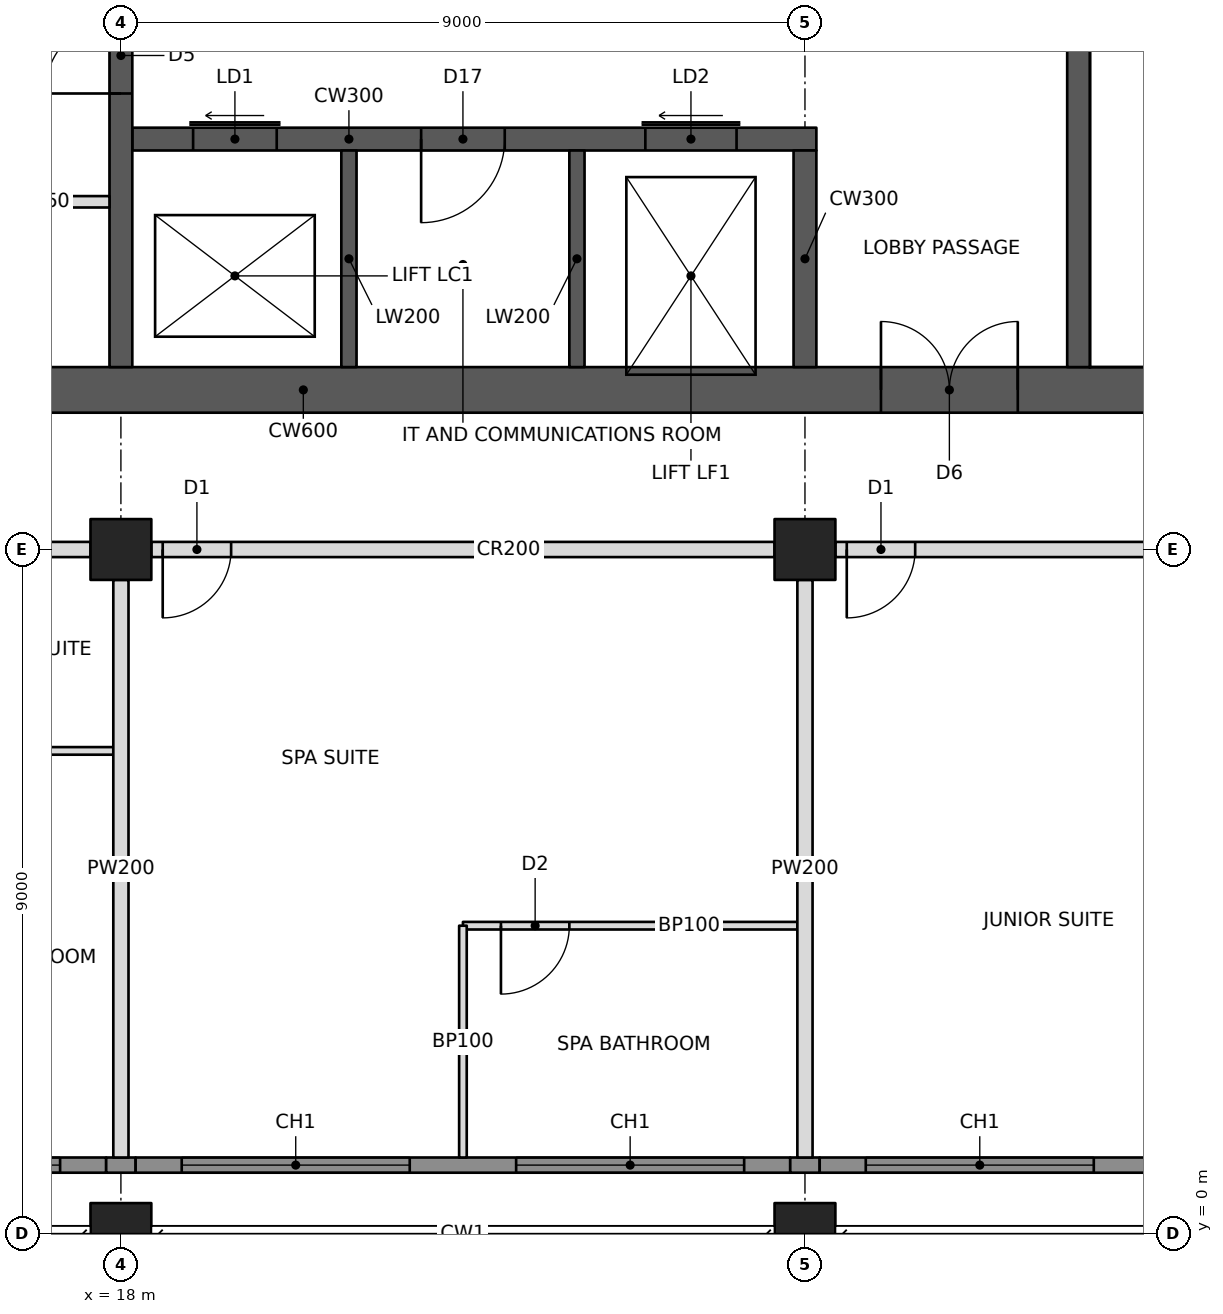
"""IFC4 building model, lengths in metres.
Left out: names, types, materials, properties, quantities, classifications, styles, units other than length and angle.
Written with IfcOpenShell. Run it as: python <this file> out.ifc"""

import sys

from ifc_helpers import new_model, si_unit, direction, frame, frame_2d, origin, origin_2d, place, context, subcontext, project, spatial, rectangle, hollow_rectangle, extrude, element, fill, save


model = new_model("IFC4")
c1 = context("Model", 3, precision=1e-05, world=origin(), true_north=direction((0.0, 1.0)))
c2 = subcontext(c1, "Body", "Model", "MODEL_VIEW")
j1 = project(units=[si_unit("LENGTHUNIT", "METRE"), si_unit("PLANEANGLEUNIT", "RADIAN")], contexts=[c1])
p1 = place(None, origin())
s1 = spatial("IfcSite", under=j1, at=p1, CompositionType="ELEMENT")
p2 = place(p1, origin())
s2 = spatial("IfcBuilding", under=s1, at=p2, CompositionType="ELEMENT")
p3 = place(p2, frame((0.0, 0.0, 187.6)))
s3 = spatial("IfcBuildingStorey", under=s2, at=p3, CompositionType="ELEMENT", Elevation=187.6)
p4 = place(p3, frame((18.0, 0.0, 0.0), z_axis=(0.0, 0.0, 1.0), x_axis=(1.0, 0.0, 0.0)))
e1 = element("IfcColumn", 1, at=p4, inside=s3, PredefinedType="COLUMN", context=c2, shape_type="SweptSolid", body=[
    extrude(hollow_rectangle(XDim=0.8, YDim=0.8, WallThickness=0.07, at=origin_2d()), origin(), (0.0, 0.0, 1.0), 3.4),
])
p5 = place(p3, frame((18.0, 9.0, 0.0), z_axis=(0.0, 0.0, 1.0), x_axis=(1.0, 0.0, 0.0)))
e2 = element("IfcColumn", 2, at=p5, inside=s3, PredefinedType="COLUMN", context=c2, shape_type="SweptSolid", body=[
    extrude(hollow_rectangle(XDim=0.8, YDim=0.8, WallThickness=0.06, at=origin_2d()), origin(), (0.0, 0.0, 1.0), 3.4),
])
p6 = place(p3, frame((27.0, 0.0, 0.0), z_axis=(0.0, 0.0, 1.0), x_axis=(1.0, 0.0, 0.0)))
e3 = element("IfcColumn", 3, at=p6, inside=s3, PredefinedType="COLUMN", context=c2, shape_type="SweptSolid", body=[
    extrude(hollow_rectangle(XDim=0.8, YDim=0.8, WallThickness=0.07, at=origin_2d()), origin(), (0.0, 0.0, 1.0), 3.4),
])
p7 = place(p3, frame((27.0, 9.0, 0.0), z_axis=(0.0, 0.0, 1.0), x_axis=(1.0, 0.0, 0.0)))
e4 = element("IfcColumn", 4, at=p7, inside=s3, PredefinedType="COLUMN", context=c2, shape_type="SweptSolid", body=[
    extrude(hollow_rectangle(XDim=0.8, YDim=0.8, WallThickness=0.06, at=origin_2d()), origin(), (0.0, 0.0, 1.0), 3.4),
])
p8 = place(p3, frame((10.8, 11.1, 0.0), z_axis=(0.0, 0.0, 1.0), x_axis=(1.0, 0.0, 0.0)))
e5 = element("IfcWall", 5, at=p8, inside=s3, PredefinedType="SHEAR", context=c2, shape_type="SweptSolid", body=[
    extrude(rectangle(XDim=23.4, YDim=0.6, at=frame_2d((11.7, 0.0))), origin(), (0.0, 0.0, 1.0), 3.4),
])
p9 = place(p8, frame((1.0, 0.0, 0.0)))
e6 = element("IfcOpeningElement", 6, at=p9, cuts=e5, PredefinedType="OPENING", context=c2, shape_type="SweptSolid", body=[
    extrude(rectangle(XDim=1.0, YDim=2.1, at=frame_2d((0.5, 1.05))), frame((0.0, 0.31, 0.0), z_axis=(0.0, -1.0, 0.0), x_axis=(1.0, 0.0, 0.0)), (0.0, 0.0, 1.0), 0.62),
])
p10 = place(p8, frame((17.2, 0.0, 0.0)))
e7 = element("IfcOpeningElement", 7, at=p10, cuts=e5, PredefinedType="OPENING", context=c2, shape_type="SweptSolid", body=[
    extrude(rectangle(XDim=1.8, YDim=2.1, at=frame_2d((0.9, 1.05))), frame((0.0, 0.31, 0.0), z_axis=(0.0, -1.0, 0.0), x_axis=(1.0, 0.0, 0.0)), (0.0, 0.0, 1.0), 0.62),
])
p11 = place(p3, frame((18.0, 11.4, 0.0), z_axis=(0.0, 0.0, 1.0), x_axis=(0.0, 1.0, 0.0)))
e8 = element("IfcWall", 8, at=p11, inside=s3, PredefinedType="SHEAR", context=c2, shape_type="SweptSolid", body=[
    extrude(rectangle(XDim=13.2, YDim=0.3, at=frame_2d((6.6, 0.0))), origin(), (0.0, 0.0, 1.0), 3.4),
])
p12 = place(p11, frame((3.6, 0.0, 0.0)))
e9 = element("IfcOpeningElement", 9, at=p12, cuts=e8, PredefinedType="OPENING", context=c2, shape_type="SweptSolid", body=[
    extrude(rectangle(XDim=1.0, YDim=2.1, at=frame_2d((0.5, 1.05))), frame((0.0, 0.16, 0.0), z_axis=(0.0, -1.0, 0.0), x_axis=(1.0, 0.0, 0.0)), (0.0, 0.0, 1.0), 0.32),
])
p13 = place(p11, frame((7.85, 0.0, 0.0)))
e10 = element("IfcOpeningElement", 10, at=p13, cuts=e8, PredefinedType="OPENING", context=c2, shape_type="SweptSolid", body=[
    extrude(rectangle(XDim=1.1, YDim=2.1, at=frame_2d((0.55, 1.05))), frame((0.0, 0.16, 0.0), z_axis=(0.0, -1.0, 0.0), x_axis=(1.0, 0.0, 0.0)), (0.0, 0.0, 1.0), 0.32),
])
p14 = place(p3, frame((18.15, 14.4, 0.0), z_axis=(0.0, 0.0, 1.0), x_axis=(1.0, 0.0, 0.0)))
e11 = element("IfcWall", 11, at=p14, inside=s3, PredefinedType="SHEAR", context=c2, shape_type="SweptSolid", body=[
    extrude(rectangle(XDim=9.0, YDim=0.3, at=frame_2d((4.5, 0.0))), origin(), (0.0, 0.0, 1.0), 3.4),
])
p15 = place(p14, frame((0.8, 0.0, 0.0)))
e12 = element("IfcOpeningElement", 12, at=p15, cuts=e11, PredefinedType="OPENING", context=c2, shape_type="SweptSolid", body=[
    extrude(rectangle(XDim=1.1, YDim=2.1, at=frame_2d((0.55, 1.05))), frame((0.0, 0.16, 0.0), z_axis=(0.0, -1.0, 0.0), x_axis=(1.0, 0.0, 0.0)), (0.0, 0.0, 1.0), 0.32),
])
p16 = place(p14, frame((6.75, 0.0, 0.0)))
e13 = element("IfcOpeningElement", 13, at=p16, cuts=e11, PredefinedType="OPENING", context=c2, shape_type="SweptSolid", body=[
    extrude(rectangle(XDim=1.2, YDim=2.1, at=frame_2d((0.6, 1.05))), frame((0.0, 0.16, 0.0), z_axis=(0.0, -1.0, 0.0), x_axis=(1.0, 0.0, 0.0)), (0.0, 0.0, 1.0), 0.32),
])
p17 = place(p14, frame((3.8, 0.0, 0.0)))
e14 = element("IfcOpeningElement", 14, at=p17, cuts=e11, PredefinedType="OPENING", context=c2, shape_type="SweptSolid", body=[
    extrude(rectangle(XDim=1.1, YDim=2.1, at=frame_2d((0.55, 1.05))), frame((0.0, 0.16, 0.0), z_axis=(0.0, -1.0, 0.0), x_axis=(1.0, 0.0, 0.0)), (0.0, 0.0, 1.0), 0.32),
])
p18 = place(p3, frame((27.0, 11.4, 0.0), z_axis=(0.0, 0.0, 1.0), x_axis=(0.0, 1.0, 0.0)))
e15 = element("IfcWall", 15, at=p18, inside=s3, PredefinedType="SHEAR", context=c2, shape_type="SweptSolid", body=[
    extrude(rectangle(XDim=2.85, YDim=0.3, at=frame_2d((1.425, 0.0))), origin(), (0.0, 0.0, 1.0), 3.4),
])
for number, where, z_axis, x_axis in (
    (16, (21.0, 11.4, 0.0), (0.0, 0.0, 1.0), (0.0, 1.0, 0.0)),
    (17, (24.0, 11.4, 0.0), (0.0, 0.0, 1.0), (0.0, 1.0, 0.0)),
):
    element("IfcWall", number, at=place(p3, frame(where, z_axis=z_axis, x_axis=x_axis)), inside=s3, PredefinedType="SHEAR", context=c2, shape_type="SweptSolid", body=[
        extrude(rectangle(XDim=2.85, YDim=0.2, at=frame_2d((1.425, 0.0))), origin(), (0.0, 0.0, 1.0), 3.4),
    ])
p19 = place(p3, frame((30.6, 11.4, 0.0), z_axis=(0.0, 0.0, 1.0), x_axis=(0.0, 1.0, 0.0)))
e18 = element("IfcWall", 18, at=p19, inside=s3, PredefinedType="SHEAR", context=c2, shape_type="SweptSolid", body=[
    extrude(rectangle(XDim=13.2, YDim=0.3, at=frame_2d((6.6, 0.0))), origin(), (0.0, 0.0, 1.0), 3.4),
])
p20 = place(p3, frame((9.4, 9.0, 0.0), z_axis=(0.0, 0.0, 1.0), x_axis=(1.0, 0.0, 0.0)))
e19 = element("IfcWall", 19, at=p20, inside=s3, PredefinedType="PARTITIONING", context=c2, shape_type="SweptSolid", body=[
    extrude(rectangle(XDim=8.2, YDim=0.2, at=frame_2d((4.1, 0.0))), origin(), (0.0, 0.0, 1.0), 2.405),
])
p21 = place(p20, frame((2.95, 0.0, 0.0)))
e20 = element("IfcOpeningElement", 20, at=p21, cuts=e19, PredefinedType="OPENING", context=c2, shape_type="SweptSolid", body=[
    extrude(rectangle(XDim=0.9, YDim=2.1, at=frame_2d((0.45, 1.05))), frame((0.0, 0.11, 0.0), z_axis=(0.0, -1.0, 0.0), x_axis=(1.0, 0.0, 0.0)), (0.0, 0.0, 1.0), 0.22),
])
p22 = place(p20, frame((4.35, 0.0, 0.0)))
e21 = element("IfcOpeningElement", 21, at=p22, cuts=e19, PredefinedType="OPENING", context=c2, shape_type="SweptSolid", body=[
    extrude(rectangle(XDim=0.9, YDim=2.1, at=frame_2d((0.45, 1.05))), frame((0.0, 0.11, 0.0), z_axis=(0.0, -1.0, 0.0), x_axis=(1.0, 0.0, 0.0)), (0.0, 0.0, 1.0), 0.22),
])
p23 = place(p3, frame((18.4, 9.0, 0.0), z_axis=(0.0, 0.0, 1.0), x_axis=(1.0, 0.0, 0.0)))
e22 = element("IfcWall", 22, at=p23, inside=s3, PredefinedType="PARTITIONING", context=c2, shape_type="SweptSolid", body=[
    extrude(rectangle(XDim=8.2, YDim=0.2, at=frame_2d((4.1, 0.0))), origin(), (0.0, 0.0, 1.0), 2.405),
])
p24 = place(p23, frame((0.15, 0.0, 0.0)))
e23 = element("IfcOpeningElement", 23, at=p24, cuts=e22, PredefinedType="OPENING", context=c2, shape_type="SweptSolid", body=[
    extrude(rectangle(XDim=0.9, YDim=2.1, at=frame_2d((0.45, 1.05))), frame((0.0, 0.11, 0.0), z_axis=(0.0, -1.0, 0.0), x_axis=(1.0, 0.0, 0.0)), (0.0, 0.0, 1.0), 0.22),
])
p25 = place(p3, frame((27.4, 9.0, 0.0), z_axis=(0.0, 0.0, 1.0), x_axis=(1.0, 0.0, 0.0)))
e24 = element("IfcWall", 24, at=p25, inside=s3, PredefinedType="PARTITIONING", context=c2, shape_type="SweptSolid", body=[
    extrude(rectangle(XDim=8.2, YDim=0.2, at=frame_2d((4.1, 0.0))), origin(), (0.0, 0.0, 1.0), 2.405),
])
p26 = place(p25, frame((0.15, 0.0, 0.0)))
e25 = element("IfcOpeningElement", 25, at=p26, cuts=e24, PredefinedType="OPENING", context=c2, shape_type="SweptSolid", body=[
    extrude(rectangle(XDim=0.9, YDim=2.1, at=frame_2d((0.45, 1.05))), frame((0.0, 0.11, 0.0), z_axis=(0.0, -1.0, 0.0), x_axis=(1.0, 0.0, 0.0)), (0.0, 0.0, 1.0), 0.22),
])
for number, where, z_axis, x_axis in (
    (26, (18.0, 8.6, 0.0), (0.0, 0.0, 1.0), (0.0, -1.0, 0.0)),
    (27, (27.0, 8.6, 0.0), (0.0, 0.0, 1.0), (0.0, -1.0, 0.0)),
):
    element("IfcWall", number, at=place(p3, frame(where, z_axis=z_axis, x_axis=x_axis)), inside=s3, PredefinedType="PARTITIONING", context=c2, shape_type="SweptSolid", body=[
        extrude(rectangle(XDim=7.6, YDim=0.2, at=frame_2d((3.8, 0.0))), origin(), (0.0, 0.0, 1.0), 2.405),
    ])
p27 = place(p3, frame((14.95, 6.35, 0.0), z_axis=(0.0, 0.0, 1.0), x_axis=(1.0, 0.0, 0.0)))
e28 = element("IfcWall", 28, at=p27, inside=s3, PredefinedType="PARTITIONING", context=c2, shape_type="SweptSolid", body=[
    extrude(rectangle(XDim=2.95, YDim=0.1, at=frame_2d((1.475, 0.0))), origin(), (0.0, 0.0, 1.0), 2.404),
])
p28 = place(p3, frame((22.5, 4.05, 0.0), z_axis=(0.0, 0.0, 1.0), x_axis=(1.0, 0.0, 0.0)))
e29 = element("IfcWall", 29, at=p28, inside=s3, PredefinedType="PARTITIONING", context=c2, shape_type="SweptSolid", body=[
    extrude(rectangle(XDim=4.4, YDim=0.1, at=frame_2d((2.2, 0.0))), origin(), (0.0, 0.0, 1.0), 2.404),
])
p29 = place(p28, frame((0.5, 0.0, 0.0)))
e30 = element("IfcOpeningElement", 30, at=p29, cuts=e29, PredefinedType="OPENING", context=c2, shape_type="SweptSolid", body=[
    extrude(rectangle(XDim=0.9, YDim=2.1, at=frame_2d((0.45, 1.05))), frame((0.0, 0.06, 0.0), z_axis=(0.0, -1.0, 0.0), x_axis=(1.0, 0.0, 0.0)), (0.0, 0.0, 1.0), 0.12),
])
p30 = place(p3, frame((22.5, 4.05, 0.0), z_axis=(0.0, 0.0, 1.0), x_axis=(0.0, -1.0, 0.0)))
e31 = element("IfcWall", 31, at=p30, inside=s3, PredefinedType="PARTITIONING", context=c2, shape_type="SweptSolid", body=[
    extrude(rectangle(XDim=3.05, YDim=0.1, at=frame_2d((1.525, 0.0))), origin(), (0.0, 0.0, 1.0), 3.2),
])
p31 = place(p3, frame((14.55, 13.575, 0.0), z_axis=(0.0, 0.0, 1.0), x_axis=(1.0, 0.0, 0.0)))
e32 = element("IfcWall", 32, at=p31, inside=s3, PredefinedType="PARTITIONING", context=c2, shape_type="SweptSolid", body=[
    extrude(rectangle(XDim=3.3, YDim=0.15, at=frame_2d((1.65, 0.0))), origin(), (0.0, 0.0, 1.0), 3.2),
])
p32 = place(p31, frame((0.3, 0.0, 0.0)))
e33 = element("IfcOpeningElement", 33, at=p32, cuts=e32, PredefinedType="OPENING", context=c2, shape_type="SweptSolid", body=[
    extrude(rectangle(XDim=1.0, YDim=2.1, at=frame_2d((0.5, 1.05))), frame((0.0, 0.085, 0.0), z_axis=(0.0, -1.0, 0.0), x_axis=(1.0, 0.0, 0.0)), (0.0, 0.0, 1.0), 0.17),
])
p33 = place(p3, frame((9.135, 0.9, 0.0), z_axis=(0.0, 0.0, 1.0), x_axis=(1.0, 0.0, 0.0)))
e34 = element("IfcWall", 34, at=p33, inside=s3, PredefinedType="SOLIDWALL", context=c2, shape_type="SweptSolid", body=[
    extrude(rectangle(XDim=8.671, YDim=0.2, at=frame_2d((4.335, 0.0))), origin(), (0.0, 0.0, 1.0), 3.2),
])
p34 = place(p33, frame((0.665, 0.0, 0.6)))
e35 = element("IfcOpeningElement", 35, at=p34, cuts=e34, PredefinedType="OPENING", context=c2, shape_type="SweptSolid", body=[
    extrude(rectangle(XDim=3.0, YDim=2.2, at=frame_2d((1.5, 1.1))), frame((0.0, 0.11, 0.0), z_axis=(0.0, -1.0, 0.0), x_axis=(1.0, 0.0, 0.0)), (0.0, 0.0, 1.0), 0.22),
])
p35 = place(p33, frame((5.065, 0.0, 0.6)))
e36 = element("IfcOpeningElement", 36, at=p35, cuts=e34, PredefinedType="OPENING", context=c2, shape_type="SweptSolid", body=[
    extrude(rectangle(XDim=3.0, YDim=2.2, at=frame_2d((1.5, 1.1))), frame((0.0, 0.11, 0.0), z_axis=(0.0, -1.0, 0.0), x_axis=(1.0, 0.0, 0.0)), (0.0, 0.0, 1.0), 0.22),
])
p36 = place(p3, frame((17.806, 0.9, 0.0), z_axis=(0.0, 0.0, 1.0), x_axis=(1.0, 0.0, 0.0)))
e37 = element("IfcWall", 37, at=p36, inside=s3, PredefinedType="SOLIDWALL", context=c2, shape_type="SweptSolid", body=[
    extrude(rectangle(XDim=0.388, YDim=0.2, at=frame_2d((0.194, 0.0))), origin(), (0.0, 0.0, 1.0), 2.404),
])
p37 = place(p3, frame((18.194, 0.9, 0.0), z_axis=(0.0, 0.0, 1.0), x_axis=(1.0, 0.0, 0.0)))
e38 = element("IfcWall", 38, at=p37, inside=s3, PredefinedType="SOLIDWALL", context=c2, shape_type="SweptSolid", body=[
    extrude(rectangle(XDim=8.612, YDim=0.2, at=frame_2d((4.306, 0.0))), origin(), (0.0, 0.0, 1.0), 3.2),
])
p38 = place(p37, frame((0.606, 0.0, 0.6)))
e39 = element("IfcOpeningElement", 39, at=p38, cuts=e38, PredefinedType="OPENING", context=c2, shape_type="SweptSolid", body=[
    extrude(rectangle(XDim=3.0, YDim=2.2, at=frame_2d((1.5, 1.1))), frame((0.0, 0.11, 0.0), z_axis=(0.0, -1.0, 0.0), x_axis=(1.0, 0.0, 0.0)), (0.0, 0.0, 1.0), 0.22),
])
p39 = place(p37, frame((5.006, 0.0, 0.6)))
e40 = element("IfcOpeningElement", 40, at=p39, cuts=e38, PredefinedType="OPENING", context=c2, shape_type="SweptSolid", body=[
    extrude(rectangle(XDim=3.0, YDim=2.2, at=frame_2d((1.5, 1.1))), frame((0.0, 0.11, 0.0), z_axis=(0.0, -1.0, 0.0), x_axis=(1.0, 0.0, 0.0)), (0.0, 0.0, 1.0), 0.22),
])
p40 = place(p3, frame((26.806, 0.9, 0.0), z_axis=(0.0, 0.0, 1.0), x_axis=(1.0, 0.0, 0.0)))
e41 = element("IfcWall", 41, at=p40, inside=s3, PredefinedType="SOLIDWALL", context=c2, shape_type="SweptSolid", body=[
    extrude(rectangle(XDim=0.388, YDim=0.2, at=frame_2d((0.194, 0.0))), origin(), (0.0, 0.0, 1.0), 2.404),
])
p41 = place(p3, frame((27.194, 0.9, 0.0), z_axis=(0.0, 0.0, 1.0), x_axis=(1.0, 0.0, 0.0)))
e42 = element("IfcWall", 42, at=p41, inside=s3, PredefinedType="SOLIDWALL", context=c2, shape_type="SweptSolid", body=[
    extrude(rectangle(XDim=8.671, YDim=0.2, at=frame_2d((4.335, 0.0))), origin(), (0.0, 0.0, 1.0), 3.2),
])
p42 = place(p41, frame((0.606, 0.0, 0.6)))
e43 = element("IfcOpeningElement", 43, at=p42, cuts=e42, PredefinedType="OPENING", context=c2, shape_type="SweptSolid", body=[
    extrude(rectangle(XDim=3.0, YDim=2.2, at=frame_2d((1.5, 1.1))), frame((0.0, 0.11, 0.0), z_axis=(0.0, -1.0, 0.0), x_axis=(1.0, 0.0, 0.0)), (0.0, 0.0, 1.0), 0.22),
])
p43 = place(p41, frame((5.006, 0.0, 0.6)))
e44 = element("IfcOpeningElement", 44, at=p43, cuts=e42, PredefinedType="OPENING", context=c2, shape_type="SweptSolid", body=[
    extrude(rectangle(XDim=3.0, YDim=2.2, at=frame_2d((1.5, 1.1))), frame((0.0, 0.11, 0.0), z_axis=(0.0, -1.0, 0.0), x_axis=(1.0, 0.0, 0.0)), (0.0, 0.0, 1.0), 0.22),
])
p44 = place(p35, origin())
e45 = element("IfcWindow", 45, at=p44, inside=s3, PartitioningType="TRIPLE_PANEL_VERTICAL", PredefinedType="WINDOW", context=c2, shape_type="SweptSolid", body=[
    extrude(rectangle(XDim=3.0, YDim=2.2, at=frame_2d((1.5, 1.1))), frame((0.0, 0.03, 0.0), z_axis=(0.0, -1.0, 0.0), x_axis=(1.0, 0.0, 0.0)), (0.0, 0.0, 1.0), 0.06),
])
fill(e36, e45)
p45 = place(p38, origin())
e46 = element("IfcWindow", 46, at=p45, inside=s3, PartitioningType="TRIPLE_PANEL_VERTICAL", PredefinedType="WINDOW", context=c2, shape_type="SweptSolid", body=[
    extrude(rectangle(XDim=3.0, YDim=2.2, at=frame_2d((1.5, 1.1))), frame((0.0, 0.03, 0.0), z_axis=(0.0, -1.0, 0.0), x_axis=(1.0, 0.0, 0.0)), (0.0, 0.0, 1.0), 0.06),
])
fill(e39, e46)
p46 = place(p39, origin())
e47 = element("IfcWindow", 47, at=p46, inside=s3, PartitioningType="TRIPLE_PANEL_VERTICAL", PredefinedType="WINDOW", context=c2, shape_type="SweptSolid", body=[
    extrude(rectangle(XDim=3.0, YDim=2.2, at=frame_2d((1.5, 1.1))), frame((0.0, 0.03, 0.0), z_axis=(0.0, -1.0, 0.0), x_axis=(1.0, 0.0, 0.0)), (0.0, 0.0, 1.0), 0.06),
])
fill(e40, e47)
p47 = place(p42, origin())
e48 = element("IfcWindow", 48, at=p47, inside=s3, PartitioningType="TRIPLE_PANEL_VERTICAL", PredefinedType="WINDOW", context=c2, shape_type="SweptSolid", body=[
    extrude(rectangle(XDim=3.0, YDim=2.2, at=frame_2d((1.5, 1.1))), frame((0.0, 0.03, 0.0), z_axis=(0.0, -1.0, 0.0), x_axis=(1.0, 0.0, 0.0)), (0.0, 0.0, 1.0), 0.06),
])
fill(e43, e48)
p48 = place(p29, frame((0.9, 0.0, 0.0), z_axis=(0.0, 0.0, 1.0), x_axis=(-1.0, 0.0, 0.0)))
e49 = element("IfcDoor", 49, at=p48, inside=s3, OperationType="SINGLE_SWING_RIGHT", PredefinedType="DOOR", context=c2, shape_type="SweptSolid", body=[
    extrude(rectangle(XDim=0.9, YDim=2.1, at=frame_2d((0.45, 1.05))), frame((0.0, 0.025, 0.0), z_axis=(0.0, -1.0, 0.0), x_axis=(1.0, 0.0, 0.0)), (0.0, 0.0, 1.0), 0.05),
])
fill(e30, e49)
p49 = place(p24, frame((0.9, 0.0, 0.0), z_axis=(0.0, 0.0, 1.0), x_axis=(-1.0, 0.0, 0.0)))
e50 = element("IfcDoor", 50, at=p49, inside=s3, OperationType="SINGLE_SWING_RIGHT", PredefinedType="DOOR", context=c2, shape_type="SweptSolid", body=[
    extrude(rectangle(XDim=0.9, YDim=2.1, at=frame_2d((0.45, 1.05))), frame((0.0, 0.025, 0.0), z_axis=(0.0, -1.0, 0.0), x_axis=(1.0, 0.0, 0.0)), (0.0, 0.0, 1.0), 0.05),
])
fill(e23, e50)
p50 = place(p26, frame((0.9, 0.0, 0.0), z_axis=(0.0, 0.0, 1.0), x_axis=(-1.0, 0.0, 0.0)))
e51 = element("IfcDoor", 51, at=p50, inside=s3, OperationType="SINGLE_SWING_RIGHT", PredefinedType="DOOR", context=c2, shape_type="SweptSolid", body=[
    extrude(rectangle(XDim=0.9, YDim=2.1, at=frame_2d((0.45, 1.05))), frame((0.0, 0.025, 0.0), z_axis=(0.0, -1.0, 0.0), x_axis=(1.0, 0.0, 0.0)), (0.0, 0.0, 1.0), 0.05),
])
fill(e25, e51)
p51 = place(p10, origin())
e52 = element("IfcDoor", 52, at=p51, inside=s3, OperationType="DOUBLE_DOOR_SINGLE_SWING", PredefinedType="DOOR", context=c2, shape_type="SweptSolid", body=[
    extrude(rectangle(XDim=1.8, YDim=2.1, at=frame_2d((0.9, 1.05))), frame((0.0, 0.025, 0.0), z_axis=(0.0, -1.0, 0.0), x_axis=(1.0, 0.0, 0.0)), (0.0, 0.0, 1.0), 0.05),
])
fill(e7, e52)
p52 = place(p12, origin())
e53 = element("IfcDoor", 53, at=p52, inside=s3, OperationType="SINGLE_SWING_LEFT", PredefinedType="DOOR", context=c2, shape_type="SweptSolid", body=[
    extrude(rectangle(XDim=1.0, YDim=2.1, at=frame_2d((0.5, 1.05))), frame((0.0, 0.025, 0.0), z_axis=(0.0, -1.0, 0.0), x_axis=(1.0, 0.0, 0.0)), (0.0, 0.0, 1.0), 0.05),
])
fill(e9, e53)
p53 = place(p15, origin())
e54 = element("IfcDoor", 54, at=p53, inside=s3, OperationType="SLIDING_TO_LEFT", PredefinedType="DOOR", context=c2, shape_type="SweptSolid", body=[
    extrude(rectangle(XDim=1.1, YDim=2.1, at=frame_2d((0.55, 1.05))), frame((0.0, 0.025, 0.0), z_axis=(0.0, -1.0, 0.0), x_axis=(1.0, 0.0, 0.0)), (0.0, 0.0, 1.0), 0.05),
])
fill(e12, e54)
p54 = place(p16, origin())
e55 = element("IfcDoor", 55, at=p54, inside=s3, OperationType="SLIDING_TO_LEFT", PredefinedType="DOOR", context=c2, shape_type="SweptSolid", body=[
    extrude(rectangle(XDim=1.2, YDim=2.1, at=frame_2d((0.6, 1.05))), frame((0.0, 0.025, 0.0), z_axis=(0.0, -1.0, 0.0), x_axis=(1.0, 0.0, 0.0)), (0.0, 0.0, 1.0), 0.05),
])
fill(e13, e55)
p55 = place(p17, frame((1.1, 0.0, 0.0), z_axis=(0.0, 0.0, 1.0), x_axis=(-1.0, 0.0, 0.0)))
e56 = element("IfcDoor", 56, at=p55, inside=s3, OperationType="SINGLE_SWING_RIGHT", PredefinedType="DOOR", context=c2, shape_type="SweptSolid", body=[
    extrude(rectangle(XDim=1.1, YDim=2.1, at=frame_2d((0.55, 1.05))), frame((0.0, 0.025, 0.0), z_axis=(0.0, -1.0, 0.0), x_axis=(1.0, 0.0, 0.0)), (0.0, 0.0, 1.0), 0.05),
])
fill(e14, e56)
save(model, sys.argv[1])
